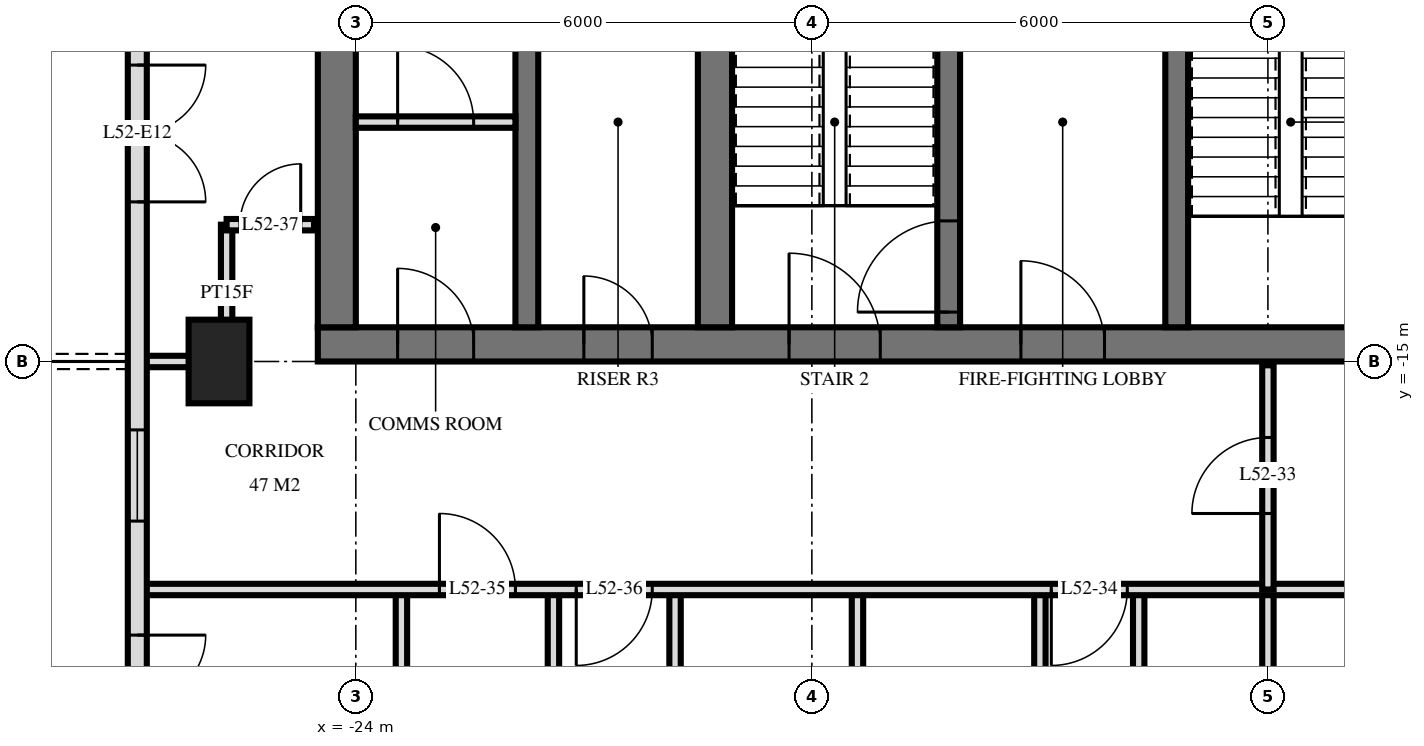
"""IFC4 building model, lengths in metres.
Left out: names, types, materials, properties, quantities, classifications, styles, units other than length and angle.
Written with IfcOpenShell. Run it as: python <this file> out.ifc"""

import sys

from ifc_helpers import new_model, si_unit, direction, frame, frame_2d, origin, origin_2d, place, context, subcontext, project, spatial, rectangle, extrude, element, fill, save


model = new_model("IFC4")
c1 = context("Model", 3, precision=1e-05, world=origin(), true_north=direction((0.0, 1.0)))
c2 = subcontext(c1, "Body", "Model", "MODEL_VIEW")
j1 = project(units=[si_unit("LENGTHUNIT", "METRE"), si_unit("PLANEANGLEUNIT", "RADIAN")], contexts=[c1])
p1 = place(None, origin())
s1 = spatial("IfcSite", under=j1, at=p1, CompositionType="ELEMENT")
p2 = place(p1, origin())
s2 = spatial("IfcBuilding", under=s1, at=p2, CompositionType="ELEMENT")
p3 = place(p2, frame((0.0, 0.0, 201.1)))
s3 = spatial("IfcBuildingStorey", under=s2, at=p3, CompositionType="ELEMENT", Elevation=201.1)
p4 = place(p3, frame((-25.8, -15.0, 0.0), z_axis=(0.0, 0.0, 1.0), x_axis=(0.0, 1.0, 0.0)))
e1 = element("IfcColumn", 1, at=p4, inside=s3, PredefinedType="COLUMN", context=c2, shape_type="SweptSolid", body=[
    extrude(rectangle(XDim=1.1, YDim=0.8, at=origin_2d()), origin(), (0.0, 0.0, 1.0), 3.5),
])
p5 = place(p3, frame((-24.5, -14.775, 0.0), z_axis=(0.0, 0.0, 1.0), x_axis=(1.0, 0.0, 0.0)))
e2 = element("IfcWall", 2, at=p5, inside=s3, PredefinedType="SHEAR", context=c2, shape_type="SweptSolid", body=[
    extrude(rectangle(XDim=14.5, YDim=0.45, at=frame_2d((7.25, 0.0))), origin(), (0.0, 0.0, 1.0), 3.5),
])
p6 = place(p5, frame((6.2, 0.0, 0.0)))
e3 = element("IfcOpeningElement", 3, at=p6, cuts=e2, PredefinedType="OPENING", context=c2, shape_type="SweptSolid", body=[
    extrude(rectangle(XDim=1.2, YDim=2.1, at=frame_2d((0.6, 1.05))), frame((0.0, 0.235, 0.0), z_axis=(0.0, -1.0, 0.0), x_axis=(1.0, 0.0, 0.0)), (0.0, 0.0, 1.0), 0.47),
])
p7 = place(p5, frame((9.25, 0.0, 0.0)))
e4 = element("IfcOpeningElement", 4, at=p7, cuts=e2, PredefinedType="OPENING", context=c2, shape_type="SweptSolid", body=[
    extrude(rectangle(XDim=1.1, YDim=2.1, at=frame_2d((0.55, 1.05))), frame((0.0, 0.235, 0.0), z_axis=(0.0, -1.0, 0.0), x_axis=(1.0, 0.0, 0.0)), (0.0, 0.0, 1.0), 0.47),
])
p8 = place(p5, frame((3.5, 0.0, 0.0)))
e5 = element("IfcOpeningElement", 5, at=p8, cuts=e2, PredefinedType="OPENING", context=c2, shape_type="SweptSolid", body=[
    extrude(rectangle(XDim=0.9, YDim=2.1, at=frame_2d((0.45, 1.05))), frame((0.0, 0.235, 0.0), z_axis=(0.0, -1.0, 0.0), x_axis=(1.0, 0.0, 0.0)), (0.0, 0.0, 1.0), 0.47),
])
p9 = place(p5, frame((1.05, 0.0, 0.0)))
e6 = element("IfcOpeningElement", 6, at=p9, cuts=e2, PredefinedType="OPENING", context=c2, shape_type="SweptSolid", body=[
    extrude(rectangle(XDim=1.0, YDim=2.1, at=frame_2d((0.5, 1.05))), frame((0.0, 0.235, 0.0), z_axis=(0.0, -1.0, 0.0), x_axis=(1.0, 0.0, 0.0)), (0.0, 0.0, 1.0), 0.47),
])
p10 = place(p3, frame((-24.25, -14.55, 0.0), z_axis=(0.0, 0.0, 1.0), x_axis=(0.0, 1.0, 0.0)))
e7 = element("IfcWall", 7, at=p10, inside=s3, PredefinedType="SHEAR", context=c2, shape_type="SweptSolid", body=[
    extrude(rectangle(XDim=14.1, YDim=0.5, at=frame_2d((7.05, 0.0))), origin(), (0.0, 0.0, 1.0), 3.5),
])
p11 = place(p3, frame((-13.2, -14.55, 0.0), z_axis=(0.0, 0.0, 1.0), x_axis=(0.0, 1.0, 0.0)))
e8 = element("IfcWall", 8, at=p11, inside=s3, PredefinedType="SHEAR", context=c2, shape_type="SweptSolid", body=[
    extrude(rectangle(XDim=5.4, YDim=0.3, at=frame_2d((2.7, 0.0))), origin(), (0.0, 0.0, 1.0), 3.5),
])
p12 = place(p11, frame((4.0, 0.0, 0.0)))
e9 = element("IfcOpeningElement", 9, at=p12, cuts=e8, PredefinedType="OPENING", context=c2, shape_type="SweptSolid", body=[
    extrude(rectangle(XDim=1.2, YDim=2.1, at=frame_2d((0.6, 1.05))), frame((0.0, 0.16, 0.0), z_axis=(0.0, -1.0, 0.0), x_axis=(1.0, 0.0, 0.0)), (0.0, 0.0, 1.0), 0.32),
])
p13 = place(p3, frame((-16.2, -14.55, 0.0), z_axis=(0.0, 0.0, 1.0), x_axis=(0.0, 1.0, 0.0)))
e10 = element("IfcWall", 10, at=p13, inside=s3, PredefinedType="SHEAR", context=c2, shape_type="SweptSolid", body=[
    extrude(rectangle(XDim=5.4, YDim=0.3, at=frame_2d((2.7, 0.0))), origin(), (0.0, 0.0, 1.0), 3.5),
])
p14 = place(p13, frame((0.2, 0.0, 0.0)))
e11 = element("IfcOpeningElement", 11, at=p14, cuts=e10, PredefinedType="OPENING", context=c2, shape_type="SweptSolid", body=[
    extrude(rectangle(XDim=1.2, YDim=2.1, at=frame_2d((0.6, 1.05))), frame((0.0, 0.16, 0.0), z_axis=(0.0, -1.0, 0.0), x_axis=(1.0, 0.0, 0.0)), (0.0, 0.0, 1.0), 0.32),
])
p15 = place(p3, frame((-19.275, -14.55, 0.0), z_axis=(0.0, 0.0, 1.0), x_axis=(0.0, 1.0, 0.0)))
e12 = element("IfcWall", 12, at=p15, inside=s3, PredefinedType="SHEAR", context=c2, shape_type="SweptSolid", body=[
    extrude(rectangle(XDim=5.4, YDim=0.45, at=frame_2d((2.7, 0.0))), origin(), (0.0, 0.0, 1.0), 3.5),
])
p16 = place(p3, frame((-21.75, -14.55, 0.0), z_axis=(0.0, 0.0, 1.0), x_axis=(0.0, 1.0, 0.0)))
e13 = element("IfcWall", 13, at=p16, inside=s3, PredefinedType="SHEAR", context=c2, shape_type="SweptSolid", body=[
    extrude(rectangle(XDim=5.4, YDim=0.3, at=frame_2d((2.7, 0.0))), origin(), (0.0, 0.0, 1.0), 3.5),
])
p17 = place(p3, frame((-26.875, -3.325, 0.0), z_axis=(0.0, 0.0, 1.0), x_axis=(0.0, -1.0, 0.0)))
e14 = element("IfcWall", 14, at=p17, inside=s3, PredefinedType="SOLIDWALL", context=c2, shape_type="SweptSolid", body=[
    extrude(rectangle(XDim=21.551, YDim=0.25, at=frame_2d((10.775, 0.0))), origin(), (0.0, 0.0, 1.0), 3.22),
])
p18 = place(p17, frame((7.775, 0.0, 0.0)))
e15 = element("IfcOpeningElement", 15, at=p18, cuts=e14, PredefinedType="OPENING", context=c2, shape_type="SweptSolid", body=[
    extrude(rectangle(XDim=1.8, YDim=2.4, at=frame_2d((0.9, 1.2))), frame((0.0, 0.135, 0.0), z_axis=(0.0, -1.0, 0.0), x_axis=(1.0, 0.0, 0.0)), (0.0, 0.0, 1.0), 0.27),
])
p19 = place(p17, frame((12.575, 0.0, 0.9)))
e16 = element("IfcOpeningElement", 16, at=p19, cuts=e14, PredefinedType="OPENING", context=c2, shape_type="SweptSolid", body=[
    extrude(rectangle(XDim=1.2, YDim=1.5, at=frame_2d((0.6, 0.75))), frame((0.0, 0.135, 0.0), z_axis=(0.0, -1.0, 0.0), x_axis=(1.0, 0.0, 0.0)), (0.0, 0.0, 1.0), 0.27),
])
p20 = place(p17, frame((15.275, 0.0, 0.0)))
e17 = element("IfcOpeningElement", 17, at=p20, cuts=e14, PredefinedType="OPENING", context=c2, shape_type="SweptSolid", body=[
    extrude(rectangle(XDim=1.8, YDim=2.4, at=frame_2d((0.9, 1.2))), frame((0.0, 0.135, 0.0), z_axis=(0.0, -1.0, 0.0), x_axis=(1.0, 0.0, 0.0)), (0.0, 0.0, 1.0), 0.27),
])
p21 = place(p17, frame((19.325, 0.0, 0.0)))
e18 = element("IfcOpeningElement", 18, at=p21, cuts=e14, PredefinedType="OPENING", context=c2, shape_type="SweptSolid", body=[
    extrude(rectangle(XDim=1.8, YDim=2.4, at=frame_2d((0.9, 1.2))), frame((0.0, 0.135, 0.0), z_axis=(0.0, -1.0, 0.0), x_axis=(1.0, 0.0, 0.0)), (0.0, 0.0, 1.0), 0.27),
])
p22 = place(p3, frame((-24.0, -11.85, 0.0), z_axis=(0.0, 0.0, 1.0), x_axis=(1.0, 0.0, 0.0)))
e19 = element("IfcWall", 19, at=p22, inside=s3, PredefinedType="PARTITIONING", context=c2, shape_type="SweptSolid", body=[
    extrude(rectangle(XDim=2.1, YDim=0.15, at=frame_2d((1.05, 0.0))), origin(), (0.0, 0.0, 1.0), 3.2),
])
p23 = place(p22, frame((0.55, 0.0, 0.0)))
e20 = element("IfcOpeningElement", 20, at=p23, cuts=e19, PredefinedType="OPENING", context=c2, shape_type="SweptSolid", body=[
    extrude(rectangle(XDim=1.0, YDim=2.1, at=frame_2d((0.5, 1.05))), frame((0.0, 0.085, 0.0), z_axis=(0.0, -1.0, 0.0), x_axis=(1.0, 0.0, 0.0)), (0.0, 0.0, 1.0), 0.17),
])
p24 = place(p3, frame((-12.0, -18.0, 0.0), z_axis=(0.0, 0.0, 1.0), x_axis=(0.0, 1.0, 0.0)))
e21 = element("IfcWall", 21, at=p24, inside=s3, PredefinedType="PARTITIONING", context=c2, shape_type="SweptSolid", body=[
    extrude(rectangle(XDim=2.95, YDim=0.15, at=frame_2d((1.475, 0.0))), origin(), (0.0, 0.0, 1.0), 3.22),
])
p25 = place(p24, frame((1.0, 0.0, 0.0)))
e22 = element("IfcOpeningElement", 22, at=p25, cuts=e21, PredefinedType="OPENING", context=c2, shape_type="SweptSolid", body=[
    extrude(rectangle(XDim=1.0, YDim=2.1, at=frame_2d((0.5, 1.05))), frame((0.0, 0.085, 0.0), z_axis=(0.0, -1.0, 0.0), x_axis=(1.0, 0.0, 0.0)), (0.0, 0.0, 1.0), 0.17),
])
p26 = place(p3, frame((-12.0, -29.22, 0.0), z_axis=(0.0, 0.0, 1.0), x_axis=(0.0, 1.0, 0.0)))
e23 = element("IfcWall", 23, at=p26, inside=s3, PredefinedType="PARTITIONING", context=c2, shape_type="SweptSolid", body=[
    extrude(rectangle(XDim=11.22, YDim=0.15, at=frame_2d((5.61, 0.0))), origin(), (0.0, 0.0, 1.0), 3.22),
])
p27 = place(p3, frame((-13.7, -22.2, 0.0), z_axis=(0.0, 0.0, 1.0), x_axis=(0.0, 1.0, 0.0)))
e24 = element("IfcWall", 24, at=p27, inside=s3, PredefinedType="PARTITIONING", context=c2, shape_type="SweptSolid", body=[
    extrude(rectangle(XDim=4.2, YDim=0.15, at=frame_2d((2.1, 0.0))), origin(), (0.0, 0.0, 1.0), 3.22),
])
p28 = place(p27, frame((1.72, 0.0, 0.0)))
e25 = element("IfcOpeningElement", 25, at=p28, cuts=e24, PredefinedType="OPENING", context=c2, shape_type="SweptSolid", body=[
    extrude(rectangle(XDim=0.8, YDim=2.1, at=frame_2d((0.4, 1.05))), frame((0.0, 0.085, 0.0), z_axis=(0.0, -1.0, 0.0), x_axis=(1.0, 0.0, 0.0)), (0.0, 0.0, 1.0), 0.17),
])
p29 = place(p3, frame((-15.0, -29.22, 0.0), z_axis=(0.0, 0.0, 1.0), x_axis=(0.0, 1.0, 0.0)))
e26 = element("IfcWall", 26, at=p29, inside=s3, PredefinedType="PARTITIONING", context=c2, shape_type="SweptSolid", body=[
    extrude(rectangle(XDim=11.22, YDim=0.15, at=frame_2d((5.61, 0.0))), origin(), (0.0, 0.0, 1.0), 3.22),
])
for number, where, z_axis, x_axis in (
    (27, (-17.4, -22.2, 0.0), (0.0, 0.0, 1.0), (0.0, 1.0, 0.0)),
    (28, (-19.8, -22.2, 0.0), (0.0, 0.0, 1.0), (0.0, 1.0, 0.0)),
    (29, (-21.4, -22.2, 0.0), (0.0, 0.0, 1.0), (0.0, 1.0, 0.0)),
):
    element("IfcWall", number, at=place(p3, frame(where, z_axis=z_axis, x_axis=x_axis)), inside=s3, PredefinedType="PARTITIONING", context=c2, shape_type="SweptSolid", body=[
        extrude(rectangle(XDim=4.2, YDim=0.15, at=frame_2d((2.1, 0.0))), origin(), (0.0, 0.0, 1.0), 3.22),
    ])
p30 = place(p3, frame((-23.4, -22.2, 0.0), z_axis=(0.0, 0.0, 1.0), x_axis=(0.0, 1.0, 0.0)))
e30 = element("IfcWall", 30, at=p30, inside=s3, PredefinedType="PARTITIONING", context=c2, shape_type="SweptSolid", body=[
    extrude(rectangle(XDim=4.2, YDim=0.15, at=frame_2d((2.1, 0.0))), origin(), (0.0, 0.0, 1.0), 3.22),
])
p31 = place(p30, frame((1.58, 0.0, 0.0)))
e31 = element("IfcOpeningElement", 31, at=p31, cuts=e30, PredefinedType="OPENING", context=c2, shape_type="SweptSolid", body=[
    extrude(rectangle(XDim=1.0, YDim=2.1, at=frame_2d((0.5, 1.05))), frame((0.0, 0.085, 0.0), z_axis=(0.0, -1.0, 0.0), x_axis=(1.0, 0.0, 0.0)), (0.0, 0.0, 1.0), 0.17),
])
p32 = place(p3, frame((-25.7, -15.0, 0.0), z_axis=(0.0, 0.0, 1.0), x_axis=(0.0, 1.0, 0.0)))
e32 = element("IfcWall", 32, at=p32, inside=s3, PredefinedType="PARTITIONING", context=c2, shape_type="SweptSolid", body=[
    extrude(rectangle(XDim=1.8, YDim=0.15, at=frame_2d((0.9, 0.0))), origin(), (0.0, 0.0, 1.0), 3.22),
])
p33 = place(p3, frame((-26.82, -18.0, 0.0), z_axis=(0.0, 0.0, 1.0), x_axis=(1.0, 0.0, 0.0)))
e33 = element("IfcWall", 33, at=p33, inside=s3, PredefinedType="PARTITIONING", context=c2, shape_type="SweptSolid", body=[
    extrude(rectangle(XDim=53.64, YDim=0.15, at=frame_2d((26.82, 0.0))), origin(), (0.0, 0.0, 1.0), 3.22),
])
p34 = place(p33, frame((11.97, 0.0, 0.0)))
e34 = element("IfcOpeningElement", 34, at=p34, cuts=e33, PredefinedType="OPENING", context=c2, shape_type="SweptSolid", body=[
    extrude(rectangle(XDim=1.0, YDim=2.1, at=frame_2d((0.5, 1.05))), frame((0.0, 0.085, 0.0), z_axis=(0.0, -1.0, 0.0), x_axis=(1.0, 0.0, 0.0)), (0.0, 0.0, 1.0), 0.17),
])
p35 = place(p33, frame((3.92, 0.0, 0.0)))
e35 = element("IfcOpeningElement", 35, at=p35, cuts=e33, PredefinedType="OPENING", context=c2, shape_type="SweptSolid", body=[
    extrude(rectangle(XDim=1.0, YDim=2.1, at=frame_2d((0.5, 1.05))), frame((0.0, 0.085, 0.0), z_axis=(0.0, -1.0, 0.0), x_axis=(1.0, 0.0, 0.0)), (0.0, 0.0, 1.0), 0.17),
])
p36 = place(p33, frame((5.72, 0.0, 0.0)))
e36 = element("IfcOpeningElement", 36, at=p36, cuts=e33, PredefinedType="OPENING", context=c2, shape_type="SweptSolid", body=[
    extrude(rectangle(XDim=1.0, YDim=2.1, at=frame_2d((0.5, 1.05))), frame((0.0, 0.085, 0.0), z_axis=(0.0, -1.0, 0.0), x_axis=(1.0, 0.0, 0.0)), (0.0, 0.0, 1.0), 0.17),
])
p37 = place(p33, frame((40.67, 0.0, 0.0)))
e37 = element("IfcOpeningElement", 37, at=p37, cuts=e33, PredefinedType="OPENING", context=c2, shape_type="SweptSolid", body=[
    extrude(rectangle(XDim=1.0, YDim=2.1, at=frame_2d((0.5, 1.05))), frame((0.0, 0.085, 0.0), z_axis=(0.0, -1.0, 0.0), x_axis=(1.0, 0.0, 0.0)), (0.0, 0.0, 1.0), 0.17),
])
p38 = place(p33, frame((48.72, 0.0, 0.0)))
e38 = element("IfcOpeningElement", 38, at=p38, cuts=e33, PredefinedType="OPENING", context=c2, shape_type="SweptSolid", body=[
    extrude(rectangle(XDim=1.0, YDim=2.1, at=frame_2d((0.5, 1.05))), frame((0.0, 0.085, 0.0), z_axis=(0.0, -1.0, 0.0), x_axis=(1.0, 0.0, 0.0)), (0.0, 0.0, 1.0), 0.17),
])
p39 = place(p33, frame((46.92, 0.0, 0.0)))
e39 = element("IfcOpeningElement", 39, at=p39, cuts=e33, PredefinedType="OPENING", context=c2, shape_type="SweptSolid", body=[
    extrude(rectangle(XDim=1.0, YDim=2.1, at=frame_2d((0.5, 1.05))), frame((0.0, 0.085, 0.0), z_axis=(0.0, -1.0, 0.0), x_axis=(1.0, 0.0, 0.0)), (0.0, 0.0, 1.0), 0.17),
])
p40 = place(p33, frame((17.32, 0.0, 0.0)))
e40 = element("IfcOpeningElement", 40, at=p40, cuts=e33, PredefinedType="OPENING", context=c2, shape_type="SweptSolid", body=[
    extrude(rectangle(XDim=1.0, YDim=2.1, at=frame_2d((0.5, 1.05))), frame((0.0, 0.085, 0.0), z_axis=(0.0, -1.0, 0.0), x_axis=(1.0, 0.0, 0.0)), (0.0, 0.0, 1.0), 0.17),
])
p41 = place(p33, frame((23.32, 0.0, 0.0)))
e41 = element("IfcOpeningElement", 41, at=p41, cuts=e33, PredefinedType="OPENING", context=c2, shape_type="SweptSolid", body=[
    extrude(rectangle(XDim=1.0, YDim=2.1, at=frame_2d((0.5, 1.05))), frame((0.0, 0.085, 0.0), z_axis=(0.0, -1.0, 0.0), x_axis=(1.0, 0.0, 0.0)), (0.0, 0.0, 1.0), 0.17),
])
p42 = place(p33, frame((29.32, 0.0, 0.0)))
e42 = element("IfcOpeningElement", 42, at=p42, cuts=e33, PredefinedType="OPENING", context=c2, shape_type="SweptSolid", body=[
    extrude(rectangle(XDim=1.0, YDim=2.1, at=frame_2d((0.5, 1.05))), frame((0.0, 0.085, 0.0), z_axis=(0.0, -1.0, 0.0), x_axis=(1.0, 0.0, 0.0)), (0.0, 0.0, 1.0), 0.17),
])
p43 = place(p33, frame((35.32, 0.0, 0.0)))
e43 = element("IfcOpeningElement", 43, at=p43, cuts=e33, PredefinedType="OPENING", context=c2, shape_type="SweptSolid", body=[
    extrude(rectangle(XDim=1.0, YDim=2.1, at=frame_2d((0.5, 1.05))), frame((0.0, 0.085, 0.0), z_axis=(0.0, -1.0, 0.0), x_axis=(1.0, 0.0, 0.0)), (0.0, 0.0, 1.0), 0.17),
])
p44 = place(p3, frame((-26.82, -15.0, 0.0), z_axis=(0.0, 0.0, 1.0), x_axis=(1.0, 0.0, 0.0)))
e44 = element("IfcWall", 44, at=p44, inside=s3, PredefinedType="PARTITIONING", context=c2, shape_type="SweptSolid", body=[
    extrude(rectangle(XDim=1.12, YDim=0.15, at=frame_2d((0.56, 0.0))), origin(), (0.0, 0.0, 1.0), 3.22),
])
p45 = place(p3, frame((-25.7, -13.2, 0.0), z_axis=(0.0, 0.0, 1.0), x_axis=(1.0, 0.0, 0.0)))
e45 = element("IfcWall", 45, at=p45, inside=s3, PredefinedType="PARTITIONING", context=c2, shape_type="SweptSolid", body=[
    extrude(rectangle(XDim=1.15, YDim=0.15, at=frame_2d((0.575, 0.0))), origin(), (0.0, 0.0, 1.0), 3.22),
])
p46 = place(p45, frame((0.175, 0.0, 0.0)))
e46 = element("IfcOpeningElement", 46, at=p46, cuts=e45, PredefinedType="OPENING", context=c2, shape_type="SweptSolid", body=[
    extrude(rectangle(XDim=0.8, YDim=2.1, at=frame_2d((0.4, 1.05))), frame((0.0, 0.085, 0.0), z_axis=(0.0, -1.0, 0.0), x_axis=(1.0, 0.0, 0.0)), (0.0, 0.0, 1.0), 0.17),
])
p47 = place(p18, origin())
e47 = element("IfcDoor", 47, at=p47, inside=s3, OperationType="DOUBLE_DOOR_SINGLE_SWING", PredefinedType="DOOR", context=c2, shape_type="SweptSolid", body=[
    extrude(rectangle(XDim=1.8, YDim=2.4, at=frame_2d((0.9, 1.2))), frame((0.0, 0.025, 0.0), z_axis=(0.0, -1.0, 0.0), x_axis=(1.0, 0.0, 0.0)), (0.0, 0.0, 1.0), 0.05),
])
fill(e15, e47)
p48 = place(p19, origin())
e48 = element("IfcWindow", 48, at=p48, inside=s3, PartitioningType="SINGLE_PANEL", PredefinedType="WINDOW", context=c2, shape_type="SweptSolid", body=[
    extrude(rectangle(XDim=1.2, YDim=1.5, at=frame_2d((0.6, 0.75))), frame((0.0, 0.03, 0.0), z_axis=(0.0, -1.0, 0.0), x_axis=(1.0, 0.0, 0.0)), (0.0, 0.0, 1.0), 0.06),
])
fill(e16, e48)
p49 = place(p20, origin())
e49 = element("IfcDoor", 49, at=p49, inside=s3, OperationType="DOUBLE_DOOR_SINGLE_SWING", PredefinedType="DOOR", context=c2, shape_type="SweptSolid", body=[
    extrude(rectangle(XDim=1.8, YDim=2.4, at=frame_2d((0.9, 1.2))), frame((0.0, 0.025, 0.0), z_axis=(0.0, -1.0, 0.0), x_axis=(1.0, 0.0, 0.0)), (0.0, 0.0, 1.0), 0.05),
])
fill(e17, e49)
p50 = place(p6, origin())
e50 = element("IfcDoor", 50, at=p50, inside=s3, OperationType="SINGLE_SWING_RIGHT", PredefinedType="DOOR", context=c2, shape_type="SweptSolid", body=[
    extrude(rectangle(XDim=1.2, YDim=2.1, at=frame_2d((0.6, 1.05))), frame((0.0, 0.025, 0.0), z_axis=(0.0, -1.0, 0.0), x_axis=(1.0, 0.0, 0.0)), (0.0, 0.0, 1.0), 0.05),
])
fill(e3, e50)
p51 = place(p7, origin())
e51 = element("IfcDoor", 51, at=p51, inside=s3, OperationType="SINGLE_SWING_RIGHT", PredefinedType="DOOR", context=c2, shape_type="SweptSolid", body=[
    extrude(rectangle(XDim=1.1, YDim=2.1, at=frame_2d((0.55, 1.05))), frame((0.0, 0.025, 0.0), z_axis=(0.0, -1.0, 0.0), x_axis=(1.0, 0.0, 0.0)), (0.0, 0.0, 1.0), 0.05),
])
fill(e4, e51)
p52 = place(p8, origin())
e52 = element("IfcDoor", 52, at=p52, inside=s3, OperationType="SINGLE_SWING_RIGHT", PredefinedType="DOOR", context=c2, shape_type="SweptSolid", body=[
    extrude(rectangle(XDim=0.9, YDim=2.1, at=frame_2d((0.45, 1.05))), frame((0.0, 0.025, 0.0), z_axis=(0.0, -1.0, 0.0), x_axis=(1.0, 0.0, 0.0)), (0.0, 0.0, 1.0), 0.05),
])
fill(e5, e52)
p53 = place(p9, origin())
e53 = element("IfcDoor", 53, at=p53, inside=s3, OperationType="SINGLE_SWING_RIGHT", PredefinedType="DOOR", context=c2, shape_type="SweptSolid", body=[
    extrude(rectangle(XDim=1.0, YDim=2.1, at=frame_2d((0.5, 1.05))), frame((0.0, 0.025, 0.0), z_axis=(0.0, -1.0, 0.0), x_axis=(1.0, 0.0, 0.0)), (0.0, 0.0, 1.0), 0.05),
])
fill(e6, e53)
p54 = place(p14, origin())
e54 = element("IfcDoor", 54, at=p54, inside=s3, OperationType="SINGLE_SWING_RIGHT", PredefinedType="DOOR", context=c2, shape_type="SweptSolid", body=[
    extrude(rectangle(XDim=1.2, YDim=2.1, at=frame_2d((0.6, 1.05))), frame((0.0, 0.025, 0.0), z_axis=(0.0, -1.0, 0.0), x_axis=(1.0, 0.0, 0.0)), (0.0, 0.0, 1.0), 0.05),
])
fill(e11, e54)
p55 = place(p23, origin())
e55 = element("IfcDoor", 55, at=p55, inside=s3, OperationType="SINGLE_SWING_RIGHT", PredefinedType="DOOR", context=c2, shape_type="SweptSolid", body=[
    extrude(rectangle(XDim=1.0, YDim=2.1, at=frame_2d((0.5, 1.05))), frame((0.0, 0.025, 0.0), z_axis=(0.0, -1.0, 0.0), x_axis=(1.0, 0.0, 0.0)), (0.0, 0.0, 1.0), 0.05),
])
fill(e20, e55)
p56 = place(p25, origin())
e56 = element("IfcDoor", 56, at=p56, inside=s3, OperationType="SINGLE_SWING_RIGHT", PredefinedType="DOOR", context=c2, shape_type="SweptSolid", body=[
    extrude(rectangle(XDim=1.0, YDim=2.1, at=frame_2d((0.5, 1.05))), frame((0.0, 0.025, 0.0), z_axis=(0.0, -1.0, 0.0), x_axis=(1.0, 0.0, 0.0)), (0.0, 0.0, 1.0), 0.05),
])
fill(e22, e56)
p57 = place(p34, frame((0.5, 0.0, 0.0), z_axis=(0.0, 0.0, 1.0), x_axis=(-1.0, 0.0, 0.0)))
e57 = element("IfcDoor", 57, at=p57, inside=s3, OperationType="SINGLE_SWING_LEFT", PredefinedType="DOOR", context=c2, shape_type="SweptSolid", body=[
    extrude(rectangle(XDim=1.0, YDim=2.1, at=frame_2d((0.0, 1.05))), frame((0.0, -0.025, 0.0), z_axis=(0.0, 1.0, 0.0), x_axis=(-1.0, 0.0, 0.0)), (0.0, 0.0, 1.0), 0.05),
])
fill(e34, e57)
p58 = place(p35, origin())
e58 = element("IfcDoor", 58, at=p58, inside=s3, OperationType="SINGLE_SWING_RIGHT", PredefinedType="DOOR", context=c2, shape_type="SweptSolid", body=[
    extrude(rectangle(XDim=1.0, YDim=2.1, at=frame_2d((0.5, 1.05))), frame((0.0, 0.025, 0.0), z_axis=(0.0, -1.0, 0.0), x_axis=(1.0, 0.0, 0.0)), (0.0, 0.0, 1.0), 0.05),
])
fill(e35, e58)
p59 = place(p36, frame((0.5, 0.0, 0.0), z_axis=(0.0, 0.0, 1.0), x_axis=(-1.0, 0.0, 0.0)))
e59 = element("IfcDoor", 59, at=p59, inside=s3, OperationType="SINGLE_SWING_LEFT", PredefinedType="DOOR", context=c2, shape_type="SweptSolid", body=[
    extrude(rectangle(XDim=1.0, YDim=2.1, at=frame_2d((0.0, 1.05))), frame((0.0, -0.025, 0.0), z_axis=(0.0, 1.0, 0.0), x_axis=(-1.0, 0.0, 0.0)), (0.0, 0.0, 1.0), 0.05),
])
fill(e36, e59)
p60 = place(p46, origin())
e60 = element("IfcDoor", 60, at=p60, inside=s3, OperationType="SINGLE_SWING_LEFT", PredefinedType="DOOR", context=c2, shape_type="SweptSolid", body=[
    extrude(rectangle(XDim=0.8, YDim=2.1, at=frame_2d((0.4, 1.05))), frame((0.0, 0.025, 0.0), z_axis=(0.0, -1.0, 0.0), x_axis=(1.0, 0.0, 0.0)), (0.0, 0.0, 1.0), 0.05),
])
fill(e46, e60)
save(model, sys.argv[1])
